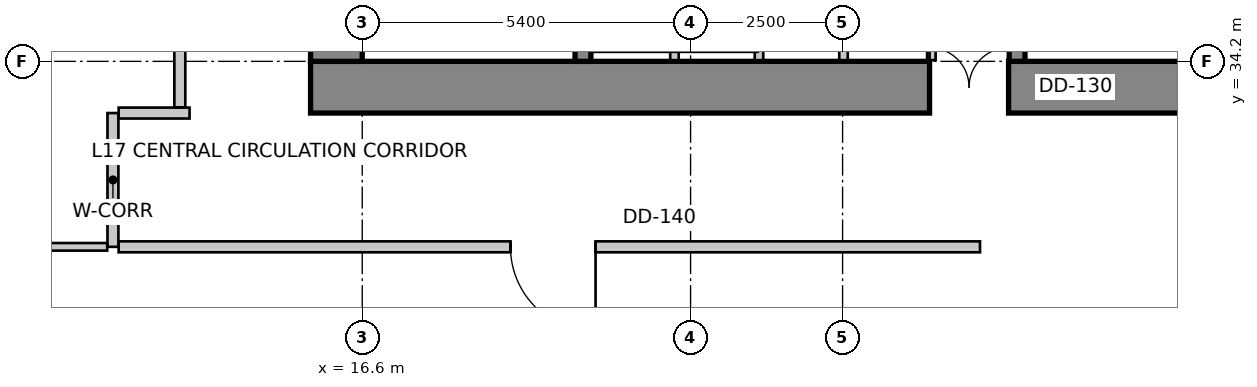
"""IFC4 building model, lengths in metres.
Left out: names, types, materials, properties, quantities, classifications, styles, units other than length and angle.
Written with IfcOpenShell. Run it as: python <this file> out.ifc"""

import sys

from ifc_helpers import new_model, si_unit, direction, frame, frame_2d, origin, place, context, subcontext, project, spatial, rectangle, extrude, source, transform, mapped, element, fill, save


model = new_model("IFC4")
c1 = context("Model", 3, precision=1e-05, world=origin(), true_north=direction((0.0, 1.0)))
c2 = subcontext(c1, "Body", "Model", "MODEL_VIEW")
j1 = project(units=[si_unit("LENGTHUNIT", "METRE"), si_unit("PLANEANGLEUNIT", "RADIAN")], contexts=[c1])
p1 = place(None, origin())
s1 = spatial("IfcSite", under=j1, at=p1, CompositionType="ELEMENT")
p2 = place(p1, origin())
s2 = spatial("IfcBuilding", under=s1, at=p2, CompositionType="ELEMENT")
p3 = place(p2, frame((0.0, 0.0, 71.0)))
s3 = spatial("IfcBuildingStorey", under=s2, at=p3, CompositionType="ELEMENT", Elevation=71.0)
p4 = place(p3, frame((15.75, 33.775, 0.0), z_axis=(0.0, 0.0, 1.0), x_axis=(1.0, 0.0, 0.0)))
e1 = element("IfcWall", 1, at=p4, inside=s3, PredefinedType="SHEAR", context=c2, shape_type="SweptSolid", body=[
    extrude(rectangle(XDim=16.1, YDim=0.85, at=frame_2d((8.05, 0.0))), origin(), (0.0, 0.0, 1.0), 4.0),
])
m1 = source(origin(), c2, "Body", "SweptSolid", [
    extrude(rectangle(XDim=1.3, YDim=2.15, at=frame_2d((0.65, 1.075))), frame((0.0, 0.435, 0.0), z_axis=(0.0, -1.0, 0.0), x_axis=(1.0, 0.0, 0.0)), (0.0, 0.0, 1.0), 0.87),
])
p5 = place(p4, frame((10.18, 0.0, 0.0)))
e2 = element("IfcOpeningElement", 2, at=p5, cuts=e1, PredefinedType="OPENING", context=c2, shape_type="MappedRepresentation", body=[
    mapped(m1, transform((0.0, 0.0, 0.0), scale=1.0)),
])
p6 = place(p3, frame((16.175, 34.2, 0.0), z_axis=(0.0, 0.0, 1.0), x_axis=(0.0, 1.0, 0.0)))
e3 = element("IfcWall", 3, at=p6, inside=s3, PredefinedType="SHEAR", context=c2, shape_type="SweptSolid", body=[
    extrude(rectangle(XDim=11.4, YDim=0.85, at=frame_2d((5.7, 0.0))), origin(), (0.0, 0.0, 1.0), 4.0),
])
m2 = source(origin(), c2, "Body", "SweptSolid", [
    extrude(rectangle(XDim=1.1, YDim=2.15, at=frame_2d((0.55, 1.075))), frame((0.0, 0.435, 0.0), z_axis=(0.0, -1.0, 0.0), x_axis=(1.0, 0.0, 0.0)), (0.0, 0.0, 1.0), 0.87),
])
p7 = place(p6, frame((7.15, 0.0, 0.0)))
e4 = element("IfcOpeningElement", 4, at=p7, cuts=e3, PredefinedType="OPENING", context=c2, shape_type="MappedRepresentation", body=[
    mapped(m2, transform((0.0, 0.0, 0.0), scale=1.0)),
])
p8 = place(p3, frame((20.23, 34.2, 0.0), z_axis=(0.0, 0.0, 1.0), x_axis=(0.0, 1.0, 0.0)))
e5 = element("IfcWall", 5, at=p8, inside=s3, PredefinedType="SHEAR", context=c2, shape_type="SweptSolid", body=[
    extrude(rectangle(XDim=9.06, YDim=0.26, at=frame_2d((4.53, 0.0))), origin(), (0.0, 0.0, 1.0), 4.0),
])
m3 = source(origin(), c2, "Body", "SweptSolid", [
    extrude(rectangle(XDim=1.1, YDim=2.15, at=frame_2d((0.55, 1.075))), frame((0.0, 0.14, 0.0), z_axis=(0.0, -1.0, 0.0), x_axis=(1.0, 0.0, 0.0)), (0.0, 0.0, 1.0), 0.28),
])
p9 = place(p8, frame((7.45, 0.0, 0.0)))
e6 = element("IfcOpeningElement", 6, at=p9, cuts=e5, PredefinedType="OPENING", context=c2, shape_type="MappedRepresentation", body=[
    mapped(m3, transform((0.0, 0.0, 0.0), scale=1.0)),
])
p10 = place(p3, frame((27.37, 34.2, 0.0), z_axis=(0.0, 0.0, 1.0), x_axis=(0.0, 1.0, 0.0)))
e7 = element("IfcWall", 7, at=p10, inside=s3, PredefinedType="SHEAR", context=c2, shape_type="SweptSolid", body=[
    extrude(rectangle(XDim=9.06, YDim=0.26, at=frame_2d((4.53, 0.0))), origin(), (0.0, 0.0, 1.0), 4.0),
])
p11 = place(p10, frame((7.45, 0.0, 0.0)))
e8 = element("IfcOpeningElement", 8, at=p11, cuts=e7, PredefinedType="OPENING", context=c2, shape_type="MappedRepresentation", body=[
    mapped(m3, transform((0.0, 0.0, 0.0), scale=1.0)),
])
p12 = place(p3, frame((13.269, 47.134, 0.0), z_axis=(0.0, 0.0, 1.0), x_axis=(-0.319920423265, -0.947444416722, 0.0)))
e9 = element("IfcWall", 9, at=p12, inside=s3, PredefinedType="SOLIDWALL", context=c2, shape_type="SweptSolid", body=[
    extrude(rectangle(XDim=16.135, YDim=0.3, at=frame_2d((8.067, 0.0))), origin(), (0.0, 0.0, 1.0), 3.75),
])
m4 = source(origin(), c2, "Body", "SweptSolid", [
    extrude(rectangle(XDim=2.4, YDim=2.2, at=frame_2d((1.2, 1.1))), frame((0.0, 0.16, 0.0), z_axis=(0.0, -1.0, 0.0), x_axis=(1.0, 0.0, 0.0)), (0.0, 0.0, 1.0), 0.32),
])
p13 = place(p12, frame((2.188, 0.0, 0.85)))
e10 = element("IfcOpeningElement", 10, at=p13, cuts=e9, PredefinedType="OPENING", context=c2, shape_type="MappedRepresentation", body=[
    mapped(m4, transform((0.0, 0.0, 0.0), scale=1.0)),
])
m5 = source(origin(), c2, "Body", "SweptSolid", [
    extrude(rectangle(XDim=2.8, YDim=2.4, at=frame_2d((1.4, 1.2))), frame((0.0, 0.16, 0.0), z_axis=(0.0, -1.0, 0.0), x_axis=(1.0, 0.0, 0.0)), (0.0, 0.0, 1.0), 0.32),
])
p14 = place(p12, frame((6.959, 0.0, 0.85)))
e11 = element("IfcOpeningElement", 11, at=p14, cuts=e9, PredefinedType="OPENING", context=c2, shape_type="MappedRepresentation", body=[
    mapped(m5, transform((0.0, 0.0, 0.0), scale=1.0)),
])
p15 = place(p12, frame((12.13, 0.0, 0.85)))
e12 = element("IfcOpeningElement", 12, at=p15, cuts=e9, PredefinedType="OPENING", context=c2, shape_type="MappedRepresentation", body=[
    mapped(m4, transform((0.0, 0.0, 0.0), scale=1.0)),
])
p16 = place(p3, frame((8.183, 31.833, 0.0), z_axis=(0.0, 0.0, 1.0), x_axis=(0.18216364648, -0.983268226834, 0.0)))
e13 = element("IfcWall", 13, at=p16, inside=s3, PredefinedType="SOLIDWALL", context=c2, shape_type="SweptSolid", body=[
    extrude(rectangle(XDim=26.678, YDim=0.3, at=frame_2d((13.339, 0.0))), origin(), (0.0, 0.0, 1.0), 3.75),
])
m6 = source(origin(), c2, "Body", "SweptSolid", [
    extrude(rectangle(XDim=1.6, YDim=2.15, at=frame_2d((0.8, 1.075))), frame((0.0, 0.16, 0.0), z_axis=(0.0, -1.0, 0.0), x_axis=(1.0, 0.0, 0.0)), (0.0, 0.0, 1.0), 0.32),
])
p17 = place(p16, frame((9.427, 0.0, 0.0)))
e14 = element("IfcOpeningElement", 14, at=p17, cuts=e13, PredefinedType="OPENING", context=c2, shape_type="MappedRepresentation", body=[
    mapped(m6, transform((0.0, 0.0, 0.0), scale=1.0)),
])
p18 = place(p16, frame((3.642, 0.0, 0.85)))
e15 = element("IfcOpeningElement", 15, at=p18, cuts=e13, PredefinedType="OPENING", context=c2, shape_type="MappedRepresentation", body=[
    mapped(m5, transform((0.0, 0.0, 0.0), scale=1.0)),
])
p19 = place(p16, frame((13.647, 0.0, 0.85)))
e16 = element("IfcOpeningElement", 16, at=p19, cuts=e13, PredefinedType="OPENING", context=c2, shape_type="MappedRepresentation", body=[
    mapped(m5, transform((0.0, 0.0, 0.0), scale=1.0)),
])
p20 = place(p16, frame((18.372, 0.0, 0.85)))
e17 = element("IfcOpeningElement", 17, at=p20, cuts=e13, PredefinedType="OPENING", context=c2, shape_type="MappedRepresentation", body=[
    mapped(m4, transform((0.0, 0.0, 0.0), scale=1.0)),
])
p21 = place(p16, frame((22.696, 0.0, 0.85)))
e18 = element("IfcOpeningElement", 18, at=p21, cuts=e13, PredefinedType="OPENING", context=c2, shape_type="MappedRepresentation", body=[
    mapped(m5, transform((0.0, 0.0, 0.0), scale=1.0)),
])
for number, where, z_axis, x_axis in (
    (19, (25.96, 34.22, 0.0), (0.0, 0.0, 1.0), (0.0, 1.0, 0.0)),
    (20, (21.735, 34.22, 0.0), (0.0, 0.0, 1.0), (0.0, 1.0, 0.0)),
    (21, (23.125, 34.22, 0.0), (0.0, 0.0, 1.0), (0.0, 1.0, 0.0)),
    (22, (24.515, 34.22, 0.0), (0.0, 0.0, 1.0), (0.0, 1.0, 0.0)),
):
    element("IfcWall", number, at=place(p3, frame(where, z_axis=z_axis, x_axis=x_axis)), inside=s3, PredefinedType="SOLIDWALL", context=c2, shape_type="SweptSolid", body=[
        extrude(rectangle(XDim=1.62, YDim=0.14, at=frame_2d((0.81, 0.0))), origin(), (0.0, 0.0, 1.0), 3.042),
    ])
p22 = place(p3, frame((12.5, 31.15, 0.0), z_axis=(0.0, 0.0, 1.0), x_axis=(0.0, 1.0, 0.0)))
e23 = element("IfcWall", 23, at=p22, inside=s3, PredefinedType="PARTITIONING", context=c2, shape_type="SweptSolid", body=[
    extrude(rectangle(XDim=2.2, YDim=0.18, at=frame_2d((1.1, 0.0))), origin(), (0.0, 0.0, 1.0), 3.434),
])
p23 = place(p3, frame((12.594, 33.35, 0.0), z_axis=(0.0, 0.0, 1.0), x_axis=(1.0, 0.0, 0.0)))
e24 = element("IfcWall", 24, at=p23, inside=s3, PredefinedType="PARTITIONING", context=c2, shape_type="SweptSolid", body=[
    extrude(rectangle(XDim=1.166, YDim=0.18, at=frame_2d((0.583, 0.0))), origin(), (0.0, 0.0, 1.0), 3.75),
])
p24 = place(p3, frame((26.76, 31.15, 0.0), z_axis=(0.0, 0.0, 1.0), x_axis=(-1.0, 0.0, 0.0)))
e25 = element("IfcWall", 25, at=p24, inside=s3, PredefinedType="PARTITIONING", context=c2, shape_type="SweptSolid", body=[
    extrude(rectangle(XDim=14.166, YDim=0.18, at=frame_2d((7.083, 0.0))), origin(), (0.0, 0.0, 1.0), 3.434),
])
m7 = source(origin(), c2, "Body", "SweptSolid", [
    extrude(rectangle(XDim=1.4, YDim=2.15, at=frame_2d((0.7, 1.075))), frame((0.0, 0.1, 0.0), z_axis=(0.0, -1.0, 0.0), x_axis=(1.0, 0.0, 0.0)), (0.0, 0.0, 1.0), 0.2),
])
p25 = place(p24, frame((6.323, 0.0, 0.0)))
e26 = element("IfcOpeningElement", 26, at=p25, cuts=e25, PredefinedType="OPENING", context=c2, shape_type="MappedRepresentation", body=[
    mapped(m7, transform((0.0, 0.0, 0.0), scale=1.0)),
])
p26 = place(p3, frame((13.6, 33.444, 0.0), z_axis=(0.0, 0.0, 1.0), x_axis=(0.0, 1.0, 0.0)))
e27 = element("IfcWall", 27, at=p26, inside=s3, PredefinedType="PARTITIONING", context=c2, shape_type="SweptSolid", body=[
    extrude(rectangle(XDim=13.896, YDim=0.18, at=frame_2d((6.948, 0.0))), origin(), (0.0, 0.0, 1.0), 2.892),
])
m8 = source(origin(), c2, "Body", "SweptSolid", [
    extrude(rectangle(XDim=0.9, YDim=2.15, at=frame_2d((0.45, 1.075))), frame((0.0, 0.1, 0.0), z_axis=(0.0, -1.0, 0.0), x_axis=(1.0, 0.0, 0.0)), (0.0, 0.0, 1.0), 0.2),
])
p27 = place(p26, frame((4.144, 0.0, 0.0)))
e28 = element("IfcOpeningElement", 28, at=p27, cuts=e27, PredefinedType="OPENING", context=c2, shape_type="MappedRepresentation", body=[
    mapped(m8, transform((0.0, 0.0, 0.0), scale=1.0)),
])
p28 = place(p3, frame((12.406, 31.15, 0.0), z_axis=(0.0, 0.0, 1.0), x_axis=(-1.0, 0.0, 0.0)))
e29 = element("IfcWall", 29, at=p28, inside=s3, PredefinedType="PARTITIONING", context=c2, shape_type="SweptSolid", body=[
    extrude(rectangle(XDim=3.979, YDim=0.125, at=frame_2d((1.99, 0.0))), origin(), (0.0, 0.0, 1.0), 2.892),
])
m9 = source(origin(), c2, "Body", "SweptSolid", [
    extrude(rectangle(XDim=1.3, YDim=2.15, at=frame_2d((0.65, 1.075))), frame((0.0, 0.025, 0.0), z_axis=(0.0, -1.0, 0.0), x_axis=(1.0, 0.0, 0.0)), (0.0, 0.0, 1.0), 0.05),
])
p29 = place(p5, origin())
e30 = element("IfcDoor", 30, at=p29, inside=s3, OperationType="DOUBLE_DOOR_SINGLE_SWING", PredefinedType="DOOR", context=c2, shape_type="MappedRepresentation", body=[
    mapped(m9, transform((0.0, 0.0, 0.0), scale=1.0)),
])
fill(e2, e30)
m10 = source(origin(), c2, "Body", "SweptSolid", [
    extrude(rectangle(XDim=1.4, YDim=2.15, at=frame_2d((0.7, 1.075))), frame((0.0, 0.025, 0.0), z_axis=(0.0, -1.0, 0.0), x_axis=(1.0, 0.0, 0.0)), (0.0, 0.0, 1.0), 0.05),
])
p30 = place(p25, origin())
e31 = element("IfcDoor", 31, at=p30, inside=s3, OperationType="SINGLE_SWING_LEFT", PredefinedType="DOOR", context=c2, shape_type="MappedRepresentation", body=[
    mapped(m10, transform((0.0, 0.0, 0.0), scale=1.0)),
])
fill(e26, e31)
save(model, sys.argv[1])
